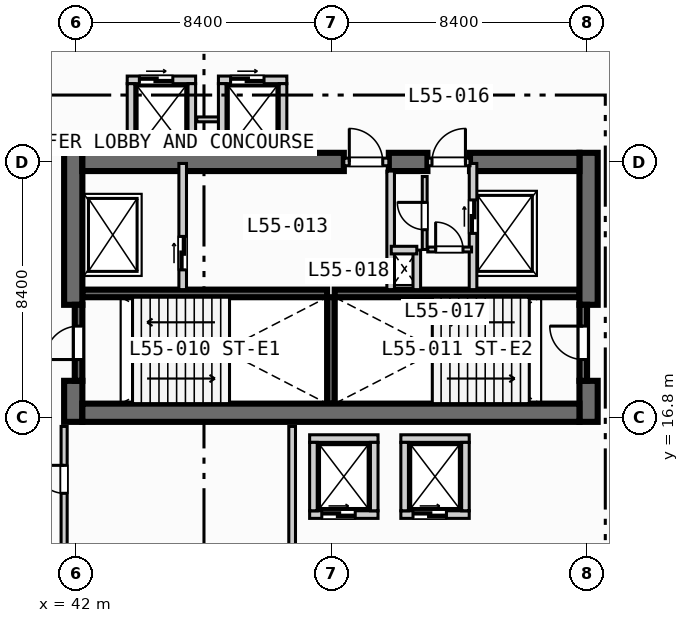
"""IFC4 building model, lengths in metres.
Left out: names, types, materials, properties, quantities, classifications, styles, units other than length and angle.
Written with IfcOpenShell. Run it as: python <this file> out.ifc"""

import sys

from ifc_helpers import new_model, si_unit, direction, frame, frame_2d, origin, place, context, subcontext, project, spatial, rectangle, extrude, element, fill, save


model = new_model("IFC4")
c1 = context("Model", 3, precision=1e-05, world=origin(), true_north=direction((0.0, 1.0)))
c2 = subcontext(c1, "Body", "Model", "MODEL_VIEW")
j1 = project(units=[si_unit("LENGTHUNIT", "METRE"), si_unit("PLANEANGLEUNIT", "RADIAN")], contexts=[c1])
p1 = place(None, origin())
s1 = spatial("IfcSite", under=j1, at=p1, CompositionType="ELEMENT")
p2 = place(p1, origin())
s2 = spatial("IfcBuilding", under=s1, at=p2, CompositionType="ELEMENT")
p3 = place(p2, frame((0.0, 0.0, 224.0)))
s3 = spatial("IfcBuildingStorey", under=s2, at=p3, CompositionType="ELEMENT", Elevation=224.0)
for number, where, z_axis, x_axis in (
    (1, (42.2, 20.875, 0.0), (0.0, 0.0, 1.0), (1.0, 0.0, 0.0)),
    (2, (50.5, 20.875, 0.0), (0.0, 0.0, 1.0), (1.0, 0.0, 0.0)),
):
    element("IfcWall", number, at=place(p3, frame(where, z_axis=z_axis, x_axis=x_axis)), inside=s3, PredefinedType="SOLIDWALL", context=c2, shape_type="SweptSolid", body=[
        extrude(rectangle(XDim=8.05, YDim=0.25, at=frame_2d((4.025, 0.0))), origin(), (0.0, 0.0, 1.0), 3.75),
    ])
p4 = place(p3, frame((50.375, 17.25, 0.0), z_axis=(0.0, 0.0, 1.0), x_axis=(0.0, 1.0, 0.0)))
e3 = element("IfcWall", 3, at=p4, inside=s3, PredefinedType="SOLIDWALL", context=c2, shape_type="SweptSolid", body=[
    extrude(rectangle(XDim=3.5, YDim=0.25, at=frame_2d((1.75, 0.0))), origin(), (0.0, 0.0, 1.0), 3.75),
])
p5 = place(p3, frame((41.9, 16.65, 0.0), z_axis=(0.0, 0.0, 1.0), x_axis=(0.0, 1.0, 0.0)))
e4 = element("IfcWall", 4, at=p5, inside=s3, PredefinedType="SHEAR", context=c2, shape_type="SweptSolid", body=[
    extrude(rectangle(XDim=1.35, YDim=0.6, at=frame_2d((0.675, 0.0))), origin(), (0.0, 0.0, 1.0), 3.75),
])
p6 = place(p3, frame((41.9, 20.5, 0.0), z_axis=(0.0, 0.0, 1.0), x_axis=(0.0, 1.0, 0.0)))
e5 = element("IfcWall", 5, at=p6, inside=s3, PredefinedType="SHEAR", context=c2, shape_type="SweptSolid", body=[
    extrude(rectangle(XDim=5.0, YDim=0.6, at=frame_2d((2.5, 0.0))), origin(), (0.0, 0.0, 1.0), 3.75),
])
p7 = place(p3, frame((58.85, 16.65, 0.0), z_axis=(0.0, 0.0, 1.0), x_axis=(0.0, 1.0, 0.0)))
e6 = element("IfcWall", 6, at=p7, inside=s3, PredefinedType="SHEAR", context=c2, shape_type="SweptSolid", body=[
    extrude(rectangle(XDim=1.35, YDim=0.6, at=frame_2d((0.675, 0.0))), origin(), (0.0, 0.0, 1.0), 3.75),
])
p8 = place(p3, frame((58.85, 20.5, 0.0), z_axis=(0.0, 0.0, 1.0), x_axis=(0.0, 1.0, 0.0)))
e7 = element("IfcWall", 7, at=p8, inside=s3, PredefinedType="SHEAR", context=c2, shape_type="SweptSolid", body=[
    extrude(rectangle(XDim=5.0, YDim=0.6, at=frame_2d((2.5, 0.0))), origin(), (0.0, 0.0, 1.0), 3.75),
])
p9 = place(p3, frame((42.2, 16.95, 0.0), z_axis=(0.0, 0.0, 1.0), x_axis=(1.0, 0.0, 0.0)))
e8 = element("IfcWall", 8, at=p9, inside=s3, PredefinedType="SHEAR", context=c2, shape_type="SweptSolid", body=[
    extrude(rectangle(XDim=16.35, YDim=0.6, at=frame_2d((8.175, 0.0))), origin(), (0.0, 0.0, 1.0), 3.75),
])
p10 = place(p3, frame((42.2, 25.2, 0.0), z_axis=(0.0, 0.0, 1.0), x_axis=(1.0, 0.0, 0.0)))
e9 = element("IfcWall", 9, at=p10, inside=s3, PredefinedType="SHEAR", context=c2, shape_type="SweptSolid", body=[
    extrude(rectangle(XDim=8.6, YDim=0.6, at=frame_2d((4.3, 0.0))), origin(), (0.0, 0.0, 1.0), 3.75),
])
p11 = place(p3, frame((52.28, 25.2, 0.0), z_axis=(0.0, 0.0, 1.0), x_axis=(1.0, 0.0, 0.0)))
e10 = element("IfcWall", 10, at=p11, inside=s3, PredefinedType="SHEAR", context=c2, shape_type="SweptSolid", body=[
    extrude(rectangle(XDim=1.27, YDim=0.6, at=frame_2d((0.635, 0.0))), origin(), (0.0, 0.0, 1.0), 3.75),
])
p12 = place(p3, frame((54.95, 25.2, 0.0), z_axis=(0.0, 0.0, 1.0), x_axis=(1.0, 0.0, 0.0)))
e11 = element("IfcWall", 11, at=p12, inside=s3, PredefinedType="SHEAR", context=c2, shape_type="SweptSolid", body=[
    extrude(rectangle(XDim=3.6, YDim=0.6, at=frame_2d((1.8, 0.0))), origin(), (0.0, 0.0, 1.0), 3.75),
])
p13 = place(p3, frame((42.075, 18.0, 0.0), z_axis=(0.0, 0.0, 1.0), x_axis=(0.0, 1.0, 0.0)))
e12 = element("IfcWall", 12, at=p13, inside=s3, PredefinedType="SOLIDWALL", context=c2, shape_type="SweptSolid", body=[
    extrude(rectangle(XDim=2.5, YDim=0.25, at=frame_2d((1.25, 0.0))), origin(), (0.0, 0.0, 1.0), 3.75),
])
p14 = place(p13, frame((0.7, 0.0, 0.0)))
e13 = element("IfcOpeningElement", 13, at=p14, cuts=e12, PredefinedType="OPENING", context=c2, shape_type="SweptSolid", body=[
    extrude(rectangle(XDim=1.1, YDim=2.15, at=frame_2d((0.55, 1.075))), frame((0.0, 0.135, 0.0), z_axis=(0.0, -1.0, 0.0), x_axis=(1.0, 0.0, 0.0)), (0.0, 0.0, 1.0), 0.27),
])
p15 = place(p3, frame((58.675, 18.0, 0.0), z_axis=(0.0, 0.0, 1.0), x_axis=(0.0, 1.0, 0.0)))
e14 = element("IfcWall", 14, at=p15, inside=s3, PredefinedType="SOLIDWALL", context=c2, shape_type="SweptSolid", body=[
    extrude(rectangle(XDim=2.5, YDim=0.25, at=frame_2d((1.25, 0.0))), origin(), (0.0, 0.0, 1.0), 3.75),
])
p16 = place(p15, frame((0.7, 0.0, 0.0)))
e15 = element("IfcOpeningElement", 15, at=p16, cuts=e14, PredefinedType="OPENING", context=c2, shape_type="SweptSolid", body=[
    extrude(rectangle(XDim=1.1, YDim=2.15, at=frame_2d((0.55, 1.075))), frame((0.0, 0.135, 0.0), z_axis=(0.0, -1.0, 0.0), x_axis=(1.0, 0.0, 0.0)), (0.0, 0.0, 1.0), 0.27),
])
p17 = place(p3, frame((45.5, 21.0, 0.0), z_axis=(0.0, 0.0, 1.0), x_axis=(0.0, 1.0, 0.0)))
e16 = element("IfcWall", 16, at=p17, inside=s3, PredefinedType="SOLIDWALL", context=c2, shape_type="SweptSolid", body=[
    extrude(rectangle(XDim=4.15, YDim=0.25, at=frame_2d((2.075, 0.0))), origin(), (0.0, 0.0, 1.0), 3.75),
])
p18 = place(p17, frame((0.65, 0.0, 0.0)))
e17 = element("IfcOpeningElement", 17, at=p18, cuts=e16, PredefinedType="OPENING", context=c2, shape_type="SweptSolid", body=[
    extrude(rectangle(XDim=1.1, YDim=2.15, at=frame_2d((0.55, 1.075))), frame((0.0, 0.135, 0.0), z_axis=(0.0, -1.0, 0.0), x_axis=(1.0, 0.0, 0.0)), (0.0, 0.0, 1.0), 0.27),
])
p19 = place(p3, frame((50.8, 25.2, 0.0), z_axis=(0.0, 0.0, 1.0), x_axis=(1.0, 0.0, 0.0)))
e18 = element("IfcWall", 18, at=p19, inside=s3, PredefinedType="SOLIDWALL", context=c2, shape_type="SweptSolid", body=[
    extrude(rectangle(XDim=1.48, YDim=0.25, at=frame_2d((0.74, 0.0))), origin(), (0.0, 0.0, 1.0), 3.75),
])
p20 = place(p19, frame((0.18, 0.0, 0.0)))
e19 = element("IfcOpeningElement", 19, at=p20, cuts=e18, PredefinedType="OPENING", context=c2, shape_type="SweptSolid", body=[
    extrude(rectangle(XDim=1.1, YDim=2.15, at=frame_2d((0.55, 1.075))), frame((0.0, 0.135, 0.0), z_axis=(0.0, -1.0, 0.0), x_axis=(1.0, 0.0, 0.0)), (0.0, 0.0, 1.0), 0.27),
])
p21 = place(p3, frame((52.34, 21.0, 0.0), z_axis=(0.0, 0.0, 1.0), x_axis=(0.0, 1.0, 0.0)))
e20 = element("IfcWall", 20, at=p21, inside=s3, PredefinedType="SOLIDWALL", context=c2, shape_type="SweptSolid", body=[
    extrude(rectangle(XDim=3.9, YDim=0.25, at=frame_2d((1.95, 0.0))), origin(), (0.0, 0.0, 1.0), 3.75),
])
p22 = place(p3, frame((55.05, 21.0, 0.0), z_axis=(0.0, 0.0, 1.0), x_axis=(0.0, 1.0, 0.0)))
e21 = element("IfcWall", 21, at=p22, inside=s3, PredefinedType="SOLIDWALL", context=c2, shape_type="SweptSolid", body=[
    extrude(rectangle(XDim=4.15, YDim=0.25, at=frame_2d((2.075, 0.0))), origin(), (0.0, 0.0, 1.0), 3.75),
])
p23 = place(p22, frame((1.85, 0.0, 0.0)))
e22 = element("IfcOpeningElement", 22, at=p23, cuts=e21, PredefinedType="OPENING", context=c2, shape_type="SweptSolid", body=[
    extrude(rectangle(XDim=1.1, YDim=2.15, at=frame_2d((0.55, 1.075))), frame((0.0, 0.135, 0.0), z_axis=(0.0, -1.0, 0.0), x_axis=(1.0, 0.0, 0.0)), (0.0, 0.0, 1.0), 0.27),
])
p24 = place(p3, frame((53.55, 25.2, 0.0), z_axis=(0.0, 0.0, 1.0), x_axis=(1.0, 0.0, 0.0)))
e23 = element("IfcWall", 23, at=p24, inside=s3, PredefinedType="SOLIDWALL", context=c2, shape_type="SweptSolid", body=[
    extrude(rectangle(XDim=1.4, YDim=0.25, at=frame_2d((0.7, 0.0))), origin(), (0.0, 0.0, 1.0), 3.75),
])
p25 = place(p24, frame((0.15, 0.0, 0.0)))
e24 = element("IfcOpeningElement", 24, at=p25, cuts=e23, PredefinedType="OPENING", context=c2, shape_type="SweptSolid", body=[
    extrude(rectangle(XDim=1.1, YDim=2.15, at=frame_2d((0.55, 1.075))), frame((0.0, 0.135, 0.0), z_axis=(0.0, -1.0, 0.0), x_axis=(1.0, 0.0, 0.0)), (0.0, 0.0, 1.0), 0.27),
])
p26 = place(p3, frame((53.2, 21.0, 0.0), z_axis=(0.0, 0.0, 1.0), x_axis=(0.0, 1.0, 0.0)))
e25 = element("IfcWall", 25, at=p26, inside=s3, PredefinedType="SOLIDWALL", context=c2, shape_type="SweptSolid", body=[
    extrude(rectangle(XDim=1.3, YDim=0.25, at=frame_2d((0.65, 0.0))), origin(), (0.0, 0.0, 1.0), 3.75),
])
p27 = place(p3, frame((52.36, 22.3, 0.0), z_axis=(0.0, 0.0, 1.0), x_axis=(1.0, 0.0, 0.0)))
e26 = element("IfcWall", 26, at=p27, inside=s3, PredefinedType="SOLIDWALL", context=c2, shape_type="SweptSolid", body=[
    extrude(rectangle(XDim=0.84, YDim=0.25, at=frame_2d((0.42, 0.0))), origin(), (0.0, 0.0, 1.0), 3.75),
])
p28 = place(p3, frame((53.56, 22.32, 0.0), z_axis=(0.0, 0.0, 1.0), x_axis=(1.0, 0.0, 0.0)))
e27 = element("IfcWall", 27, at=p28, inside=s3, PredefinedType="PARTITIONING", context=c2, shape_type="SweptSolid", body=[
    extrude(rectangle(XDim=1.44, YDim=0.16, at=frame_2d((0.72, 0.0))), origin(), (0.0, 0.0, 1.0), 3.75),
])
p29 = place(p28, frame((0.26, 0.0, 0.0)))
e28 = element("IfcOpeningElement", 28, at=p29, cuts=e27, PredefinedType="OPENING", context=c2, shape_type="SweptSolid", body=[
    extrude(rectangle(XDim=0.9, YDim=2.1, at=frame_2d((0.45, 1.05))), frame((0.0, 0.09, 0.0), z_axis=(0.0, -1.0, 0.0), x_axis=(1.0, 0.0, 0.0)), (0.0, 0.0, 1.0), 0.18),
])
p30 = place(p3, frame((53.46, 22.32, 0.0), z_axis=(0.0, 0.0, 1.0), x_axis=(0.0, 1.0, 0.0)))
e29 = element("IfcWall", 29, at=p30, inside=s3, PredefinedType="PARTITIONING", context=c2, shape_type="SweptSolid", body=[
    extrude(rectangle(XDim=2.4, YDim=0.16, at=frame_2d((1.2, 0.0))), origin(), (0.0, 0.0, 1.0), 3.75),
])
p31 = place(p30, frame((0.65, 0.0, 0.0)))
e30 = element("IfcOpeningElement", 30, at=p31, cuts=e29, PredefinedType="OPENING", context=c2, shape_type="SweptSolid", body=[
    extrude(rectangle(XDim=0.9, YDim=2.1, at=frame_2d((0.45, 1.05))), frame((0.0, 0.09, 0.0), z_axis=(0.0, -1.0, 0.0), x_axis=(1.0, 0.0, 0.0)), (0.0, 0.0, 1.0), 0.18),
])
p32 = place(p3, frame((49.675, 13.6, 0.0), z_axis=(0.0, 0.0, 1.0), x_axis=(1.0, 0.0, 0.0)))
e31 = element("IfcWall", 31, at=p32, inside=s3, PredefinedType="SOLIDWALL", context=c2, shape_type="SweptSolid", body=[
    extrude(rectangle(XDim=2.25, YDim=0.25, at=frame_2d((1.125, 0.0))), origin(), (0.0, 0.0, 1.0), 3.75),
])
p33 = place(p32, frame((0.4, 0.0, 0.0)))
e32 = element("IfcOpeningElement", 32, at=p33, cuts=e31, PredefinedType="OPENING", context=c2, shape_type="SweptSolid", body=[
    extrude(rectangle(XDim=1.1, YDim=2.15, at=frame_2d((0.55, 1.075))), frame((0.0, 0.135, 0.0), z_axis=(0.0, -1.0, 0.0), x_axis=(1.0, 0.0, 0.0)), (0.0, 0.0, 1.0), 0.27),
])
for number, where, z_axis, x_axis in (
    (33, (49.675, 16.1, 0.0), (0.0, 0.0, 1.0), (1.0, 0.0, 0.0)),
    (34, (49.8, 13.725, 0.0), (0.0, 0.0, 1.0), (0.0, 1.0, 0.0)),
    (35, (51.8, 13.725, 0.0), (0.0, 0.0, 1.0), (0.0, 1.0, 0.0)),
):
    element("IfcWall", number, at=place(p3, frame(where, z_axis=z_axis, x_axis=x_axis)), inside=s3, PredefinedType="SOLIDWALL", context=c2, shape_type="SweptSolid", body=[
        extrude(rectangle(XDim=2.25, YDim=0.25, at=frame_2d((1.125, 0.0))), origin(), (0.0, 0.0, 1.0), 3.75),
    ])
p34 = place(p3, frame((52.675, 13.6, 0.0), z_axis=(0.0, 0.0, 1.0), x_axis=(1.0, 0.0, 0.0)))
e36 = element("IfcWall", 36, at=p34, inside=s3, PredefinedType="SOLIDWALL", context=c2, shape_type="SweptSolid", body=[
    extrude(rectangle(XDim=2.25, YDim=0.25, at=frame_2d((1.125, 0.0))), origin(), (0.0, 0.0, 1.0), 3.75),
])
p35 = place(p34, frame((0.4, 0.0, 0.0)))
e37 = element("IfcOpeningElement", 37, at=p35, cuts=e36, PredefinedType="OPENING", context=c2, shape_type="SweptSolid", body=[
    extrude(rectangle(XDim=1.1, YDim=2.15, at=frame_2d((0.55, 1.075))), frame((0.0, 0.135, 0.0), z_axis=(0.0, -1.0, 0.0), x_axis=(1.0, 0.0, 0.0)), (0.0, 0.0, 1.0), 0.27),
])
for number, where, z_axis, x_axis in (
    (38, (52.675, 16.1, 0.0), (0.0, 0.0, 1.0), (1.0, 0.0, 0.0)),
    (39, (52.8, 13.725, 0.0), (0.0, 0.0, 1.0), (0.0, 1.0, 0.0)),
    (40, (54.8, 13.725, 0.0), (0.0, 0.0, 1.0), (0.0, 1.0, 0.0)),
):
    element("IfcWall", number, at=place(p3, frame(where, z_axis=z_axis, x_axis=x_axis)), inside=s3, PredefinedType="SOLIDWALL", context=c2, shape_type="SweptSolid", body=[
        extrude(rectangle(XDim=2.25, YDim=0.25, at=frame_2d((1.125, 0.0))), origin(), (0.0, 0.0, 1.0), 3.75),
    ])
p36 = place(p3, frame((43.675, 27.9, 0.0), z_axis=(0.0, 0.0, 1.0), x_axis=(1.0, 0.0, 0.0)))
e41 = element("IfcWall", 41, at=p36, inside=s3, PredefinedType="SOLIDWALL", context=c2, shape_type="SweptSolid", body=[
    extrude(rectangle(XDim=2.25, YDim=0.25, at=frame_2d((1.125, 0.0))), origin(), (0.0, 0.0, 1.0), 3.75),
])
p37 = place(p36, frame((0.4, 0.0, 0.0)))
e42 = element("IfcOpeningElement", 42, at=p37, cuts=e41, PredefinedType="OPENING", context=c2, shape_type="SweptSolid", body=[
    extrude(rectangle(XDim=1.1, YDim=2.15, at=frame_2d((0.55, 1.075))), frame((0.0, 0.135, 0.0), z_axis=(0.0, -1.0, 0.0), x_axis=(1.0, 0.0, 0.0)), (0.0, 0.0, 1.0), 0.27),
])
for number, where, z_axis, x_axis in (
    (43, (43.8, 25.45, 0.0), (0.0, 0.0, 1.0), (0.0, 1.0, 0.0)),
    (44, (45.8, 25.45, 0.0), (0.0, 0.0, 1.0), (0.0, 1.0, 0.0)),
):
    element("IfcWall", number, at=place(p3, frame(where, z_axis=z_axis, x_axis=x_axis)), inside=s3, PredefinedType="SOLIDWALL", context=c2, shape_type="SweptSolid", body=[
        extrude(rectangle(XDim=2.325, YDim=0.25, at=frame_2d((1.163, 0.0))), origin(), (0.0, 0.0, 1.0), 3.75),
    ])
p38 = place(p3, frame((45.96, 26.6, 0.0), z_axis=(0.0, 0.0, 1.0), x_axis=(1.0, 0.0, 0.0)))
e45 = element("IfcWall", 45, at=p38, inside=s3, PredefinedType="PARTITIONING", context=c2, shape_type="SweptSolid", body=[
    extrude(rectangle(XDim=0.88, YDim=0.16, at=frame_2d((0.44, 0.0))), origin(), (0.0, 0.0, 1.0), 3.75),
])
p39 = place(p3, frame((46.675, 27.9, 0.0), z_axis=(0.0, 0.0, 1.0), x_axis=(1.0, 0.0, 0.0)))
e46 = element("IfcWall", 46, at=p39, inside=s3, PredefinedType="SOLIDWALL", context=c2, shape_type="SweptSolid", body=[
    extrude(rectangle(XDim=2.25, YDim=0.25, at=frame_2d((1.125, 0.0))), origin(), (0.0, 0.0, 1.0), 3.75),
])
p40 = place(p39, frame((0.4, 0.0, 0.0)))
e47 = element("IfcOpeningElement", 47, at=p40, cuts=e46, PredefinedType="OPENING", context=c2, shape_type="SweptSolid", body=[
    extrude(rectangle(XDim=1.1, YDim=2.15, at=frame_2d((0.55, 1.075))), frame((0.0, 0.135, 0.0), z_axis=(0.0, -1.0, 0.0), x_axis=(1.0, 0.0, 0.0)), (0.0, 0.0, 1.0), 0.27),
])
for number, where, z_axis, x_axis in (
    (48, (46.8, 25.45, 0.0), (0.0, 0.0, 1.0), (0.0, 1.0, 0.0)),
    (49, (48.8, 25.45, 0.0), (0.0, 0.0, 1.0), (0.0, 1.0, 0.0)),
):
    element("IfcWall", number, at=place(p3, frame(where, z_axis=z_axis, x_axis=x_axis)), inside=s3, PredefinedType="SOLIDWALL", context=c2, shape_type="SweptSolid", body=[
        extrude(rectangle(XDim=2.325, YDim=0.25, at=frame_2d((1.163, 0.0))), origin(), (0.0, 0.0, 1.0), 3.75),
    ])
p41 = place(p3, frame((41.6, 0.3, 0.0), z_axis=(0.0, 0.0, 1.0), x_axis=(0.0, 1.0, 0.0)))
e50 = element("IfcWall", 50, at=p41, inside=s3, PredefinedType="PARTITIONING", context=c2, shape_type="SweptSolid", body=[
    extrude(rectangle(XDim=16.2, YDim=0.2, at=frame_2d((8.1, 0.0))), origin(), (0.0, 0.0, 1.0), 3.75),
])
p42 = place(p41, frame((14.0, 0.0, 0.0)))
e51 = element("IfcOpeningElement", 51, at=p42, cuts=e50, PredefinedType="OPENING", context=c2, shape_type="SweptSolid", body=[
    extrude(rectangle(XDim=0.92, YDim=2.1, at=frame_2d((0.46, 1.05))), frame((0.0, 0.11, 0.0), z_axis=(0.0, -1.0, 0.0), x_axis=(1.0, 0.0, 0.0)), (0.0, 0.0, 1.0), 0.22),
])
p43 = place(p3, frame((49.1, 0.3, 0.0), z_axis=(0.0, 0.0, 1.0), x_axis=(0.0, 1.0, 0.0)))
e52 = element("IfcWall", 52, at=p43, inside=s3, PredefinedType="PARTITIONING", context=c2, shape_type="SweptSolid", body=[
    extrude(rectangle(XDim=16.2, YDim=0.22, at=frame_2d((8.1, 0.0))), origin(), (0.0, 0.0, 1.0), 3.75),
])
p44 = place(p14, origin())
e53 = element("IfcDoor", 53, at=p44, inside=s3, OperationType="SINGLE_SWING_LEFT", PredefinedType="DOOR", context=c2, shape_type="SweptSolid", body=[
    extrude(rectangle(XDim=1.1, YDim=2.15, at=frame_2d((0.55, 1.075))), frame((0.0, 0.025, 0.0), z_axis=(0.0, -1.0, 0.0), x_axis=(1.0, 0.0, 0.0)), (0.0, 0.0, 1.0), 0.05),
])
fill(e13, e53)
p45 = place(p16, origin())
e54 = element("IfcDoor", 54, at=p45, inside=s3, OperationType="SINGLE_SWING_RIGHT", PredefinedType="DOOR", context=c2, shape_type="SweptSolid", body=[
    extrude(rectangle(XDim=1.1, YDim=2.15, at=frame_2d((0.55, 1.075))), frame((0.0, 0.025, 0.0), z_axis=(0.0, -1.0, 0.0), x_axis=(1.0, 0.0, 0.0)), (0.0, 0.0, 1.0), 0.05),
])
fill(e15, e54)
p46 = place(p18, origin())
e55 = element("IfcDoor", 55, at=p46, inside=s3, OperationType="SLIDING_TO_LEFT", PredefinedType="DOOR", context=c2, shape_type="SweptSolid", body=[
    extrude(rectangle(XDim=1.1, YDim=2.15, at=frame_2d((0.55, 1.075))), frame((0.0, 0.025, 0.0), z_axis=(0.0, -1.0, 0.0), x_axis=(1.0, 0.0, 0.0)), (0.0, 0.0, 1.0), 0.05),
])
fill(e17, e55)
p47 = place(p20, origin())
e56 = element("IfcDoor", 56, at=p47, inside=s3, OperationType="SINGLE_SWING_LEFT", PredefinedType="DOOR", context=c2, shape_type="SweptSolid", body=[
    extrude(rectangle(XDim=1.1, YDim=2.15, at=frame_2d((0.55, 1.075))), frame((0.0, 0.025, 0.0), z_axis=(0.0, -1.0, 0.0), x_axis=(1.0, 0.0, 0.0)), (0.0, 0.0, 1.0), 0.05),
])
fill(e19, e56)
p48 = place(p23, origin())
e57 = element("IfcDoor", 57, at=p48, inside=s3, OperationType="SLIDING_TO_LEFT", PredefinedType="DOOR", context=c2, shape_type="SweptSolid", body=[
    extrude(rectangle(XDim=1.1, YDim=2.15, at=frame_2d((0.55, 1.075))), frame((0.0, 0.025, 0.0), z_axis=(0.0, -1.0, 0.0), x_axis=(1.0, 0.0, 0.0)), (0.0, 0.0, 1.0), 0.05),
])
fill(e22, e57)
p49 = place(p25, origin())
e58 = element("IfcDoor", 58, at=p49, inside=s3, OperationType="SINGLE_SWING_RIGHT", PredefinedType="DOOR", context=c2, shape_type="SweptSolid", body=[
    extrude(rectangle(XDim=1.1, YDim=2.15, at=frame_2d((0.55, 1.075))), frame((0.0, 0.025, 0.0), z_axis=(0.0, -1.0, 0.0), x_axis=(1.0, 0.0, 0.0)), (0.0, 0.0, 1.0), 0.05),
])
fill(e24, e58)
p50 = place(p29, origin())
e59 = element("IfcDoor", 59, at=p50, inside=s3, OperationType="SINGLE_SWING_LEFT", PredefinedType="DOOR", context=c2, shape_type="SweptSolid", body=[
    extrude(rectangle(XDim=0.9, YDim=2.1, at=frame_2d((0.45, 1.05))), frame((0.0, 0.025, 0.0), z_axis=(0.0, -1.0, 0.0), x_axis=(1.0, 0.0, 0.0)), (0.0, 0.0, 1.0), 0.05),
])
fill(e28, e59)
p51 = place(p31, origin())
e60 = element("IfcDoor", 60, at=p51, inside=s3, OperationType="SINGLE_SWING_RIGHT", PredefinedType="DOOR", context=c2, shape_type="SweptSolid", body=[
    extrude(rectangle(XDim=0.9, YDim=2.1, at=frame_2d((0.45, 1.05))), frame((0.0, 0.025, 0.0), z_axis=(0.0, -1.0, 0.0), x_axis=(1.0, 0.0, 0.0)), (0.0, 0.0, 1.0), 0.05),
])
fill(e30, e60)
p52 = place(p33, origin())
e61 = element("IfcDoor", 61, at=p52, inside=s3, OperationType="SLIDING_TO_LEFT", PredefinedType="DOOR", context=c2, shape_type="SweptSolid", body=[
    extrude(rectangle(XDim=1.1, YDim=2.15, at=frame_2d((0.55, 1.075))), frame((0.0, 0.025, 0.0), z_axis=(0.0, -1.0, 0.0), x_axis=(1.0, 0.0, 0.0)), (0.0, 0.0, 1.0), 0.05),
])
fill(e32, e61)
p53 = place(p35, origin())
e62 = element("IfcDoor", 62, at=p53, inside=s3, OperationType="SLIDING_TO_LEFT", PredefinedType="DOOR", context=c2, shape_type="SweptSolid", body=[
    extrude(rectangle(XDim=1.1, YDim=2.15, at=frame_2d((0.55, 1.075))), frame((0.0, 0.025, 0.0), z_axis=(0.0, -1.0, 0.0), x_axis=(1.0, 0.0, 0.0)), (0.0, 0.0, 1.0), 0.05),
])
fill(e37, e62)
p54 = place(p37, origin())
e63 = element("IfcDoor", 63, at=p54, inside=s3, OperationType="SLIDING_TO_LEFT", PredefinedType="DOOR", context=c2, shape_type="SweptSolid", body=[
    extrude(rectangle(XDim=1.1, YDim=2.15, at=frame_2d((0.55, 1.075))), frame((0.0, 0.025, 0.0), z_axis=(0.0, -1.0, 0.0), x_axis=(1.0, 0.0, 0.0)), (0.0, 0.0, 1.0), 0.05),
])
fill(e42, e63)
p55 = place(p40, origin())
e64 = element("IfcDoor", 64, at=p55, inside=s3, OperationType="SLIDING_TO_LEFT", PredefinedType="DOOR", context=c2, shape_type="SweptSolid", body=[
    extrude(rectangle(XDim=1.1, YDim=2.15, at=frame_2d((0.55, 1.075))), frame((0.0, 0.025, 0.0), z_axis=(0.0, -1.0, 0.0), x_axis=(1.0, 0.0, 0.0)), (0.0, 0.0, 1.0), 0.05),
])
fill(e47, e64)
p56 = place(p42, origin())
e65 = element("IfcDoor", 65, at=p56, inside=s3, OperationType="SINGLE_SWING_RIGHT", PredefinedType="DOOR", context=c2, shape_type="SweptSolid", body=[
    extrude(rectangle(XDim=0.92, YDim=2.1, at=frame_2d((0.46, 1.05))), frame((0.0, 0.025, 0.0), z_axis=(0.0, -1.0, 0.0), x_axis=(1.0, 0.0, 0.0)), (0.0, 0.0, 1.0), 0.05),
])
fill(e51, e65)
save(model, sys.argv[1])
